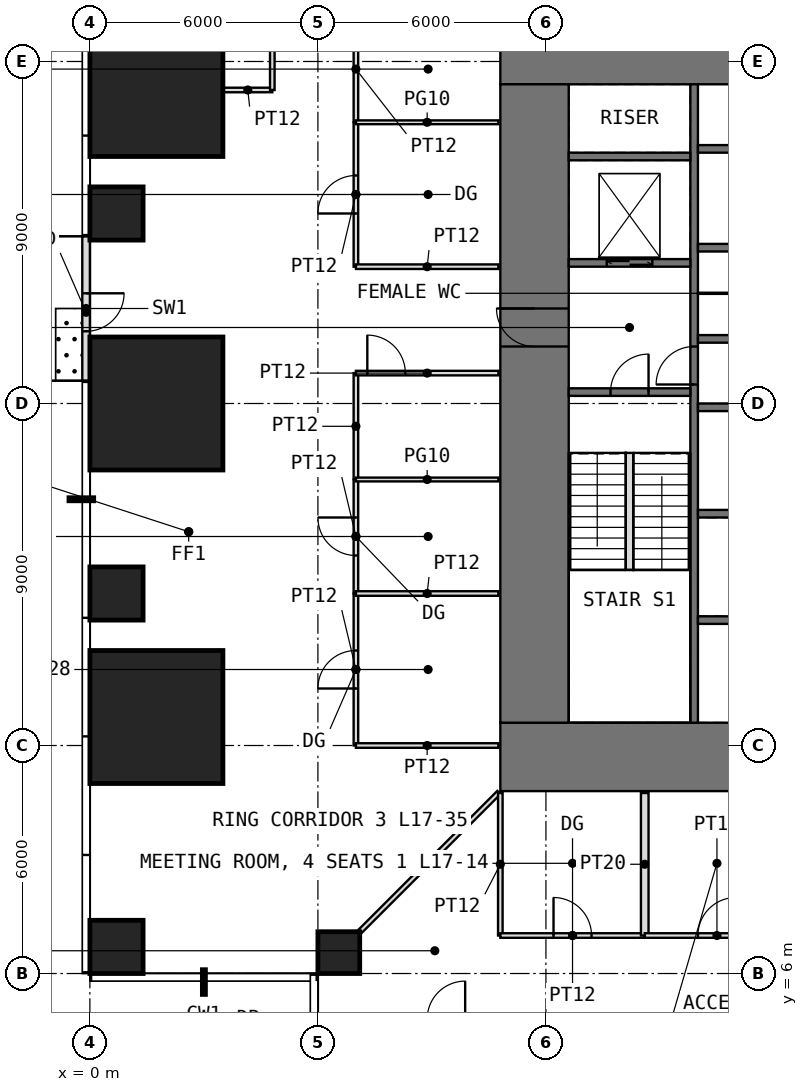
"""IFC4 building model, lengths in metres.
Left out: names, types, materials, properties, quantities, classifications, styles, units other than length and angle.
Written with IfcOpenShell. Run it as: python <this file> out.ifc"""

import sys

from ifc_helpers import new_model, si_unit, direction, frame, frame_2d, origin, origin_2d, place, context, subcontext, project, spatial, rectangle, extrude, element, fill, save


model = new_model("IFC4")
c1 = context("Model", 3, precision=1e-05, world=origin(), true_north=direction((0.0, 1.0)))
c2 = subcontext(c1, "Body", "Model", "MODEL_VIEW")
j1 = project(units=[si_unit("LENGTHUNIT", "METRE"), si_unit("PLANEANGLEUNIT", "RADIAN")], contexts=[c1])
p1 = place(None, origin())
s1 = spatial("IfcSite", under=j1, at=p1, CompositionType="ELEMENT")
p2 = place(p1, origin())
s2 = spatial("IfcBuilding", under=s1, at=p2, CompositionType="ELEMENT")
p3 = place(p2, frame((0.0, 0.0, 74.5)))
s3 = spatial("IfcBuildingStorey", under=s2, at=p3, CompositionType="ELEMENT", Elevation=74.5)
p4 = place(p3, frame((0.7, 6.7, 0.0), z_axis=(0.0, 0.0, 1.0), x_axis=(1.0, 0.0, 0.0)))
e1 = element("IfcColumn", 1, at=p4, inside=s3, PredefinedType="COLUMN", context=c2, shape_type="SweptSolid", body=[
    extrude(rectangle(XDim=1.4, YDim=1.4, at=origin_2d()), origin(), (0.0, 0.0, 1.0), 4.0),
])
p5 = place(p3, frame((6.55, 6.55, 0.0), z_axis=(0.0, 0.0, 1.0), x_axis=(1.0, 0.0, 0.0)))
e2 = element("IfcColumn", 2, at=p5, inside=s3, PredefinedType="COLUMN", context=c2, shape_type="SweptSolid", body=[
    extrude(rectangle(XDim=1.1, YDim=1.1, at=origin_2d()), origin(), (0.0, 0.0, 1.0), 4.0),
])
p6 = place(p3, frame((1.75, 12.75, 0.0), z_axis=(0.0, 0.0, 1.0), x_axis=(1.0, 0.0, 0.0)))
e3 = element("IfcColumn", 3, at=p6, inside=s3, PredefinedType="COLUMN", context=c2, shape_type="SweptSolid", body=[
    extrude(rectangle(XDim=3.5, YDim=3.5, at=origin_2d()), origin(), (0.0, 0.0, 1.0), 4.0),
])
p7 = place(p3, frame((0.7, 16.0, 0.0), z_axis=(0.0, 0.0, 1.0), x_axis=(1.0, 0.0, 0.0)))
e4 = element("IfcColumn", 4, at=p7, inside=s3, PredefinedType="COLUMN", context=c2, shape_type="SweptSolid", body=[
    extrude(rectangle(XDim=1.4, YDim=1.4, at=origin_2d()), origin(), (0.0, 0.0, 1.0), 4.0),
])
p8 = place(p3, frame((1.75, 21.0, 0.0), z_axis=(0.0, 0.0, 1.0), x_axis=(1.0, 0.0, 0.0)))
e5 = element("IfcColumn", 5, at=p8, inside=s3, PredefinedType="COLUMN", context=c2, shape_type="SweptSolid", body=[
    extrude(rectangle(XDim=3.5, YDim=3.5, at=origin_2d()), origin(), (0.0, 0.0, 1.0), 4.0),
])
p9 = place(p3, frame((0.7, 26.0, 0.0), z_axis=(0.0, 0.0, 1.0), x_axis=(1.0, 0.0, 0.0)))
e6 = element("IfcColumn", 6, at=p9, inside=s3, PredefinedType="COLUMN", context=c2, shape_type="SweptSolid", body=[
    extrude(rectangle(XDim=1.4, YDim=1.4, at=origin_2d()), origin(), (0.0, 0.0, 1.0), 4.0),
])
p10 = place(p3, frame((1.75, 29.25, 0.0), z_axis=(0.0, 0.0, 1.0), x_axis=(1.0, 0.0, 0.0)))
e7 = element("IfcColumn", 7, at=p10, inside=s3, PredefinedType="COLUMN", context=c2, shape_type="SweptSolid", body=[
    extrude(rectangle(XDim=3.5, YDim=3.5, at=origin_2d()), origin(), (0.0, 0.0, 1.0), 4.0),
])
p11 = place(p3, frame((-0.1, 25.4, 0.0), z_axis=(0.0, 0.0, 1.0), x_axis=(0.0, -1.0, 0.0)))
e8 = element("IfcWall", 8, at=p11, inside=s3, PredefinedType="USERDEFINED", context=c2, shape_type="SweptSolid", body=[
    extrude(rectangle(XDim=3.8, YDim=0.2, at=frame_2d((1.9, 0.0))), origin(), (0.0, 0.0, 1.0), 3.75),
])
p12 = place(p11, frame((1.5, 0.0, 0.0)))
e9 = element("IfcOpeningElement", 9, at=p12, cuts=e8, PredefinedType="OPENING", context=c2, shape_type="SweptSolid", body=[
    extrude(rectangle(XDim=1.0, YDim=2.4, at=frame_2d((0.5, 1.2))), frame((0.0, 0.11, 0.0), z_axis=(0.0, -1.0, 0.0), x_axis=(1.0, 0.0, 0.0)), (0.0, 0.0, 1.0), 0.22),
])
p13 = place(p3, frame((10.8, 11.7, -0.05), z_axis=(0.0, 0.0, 1.0), x_axis=(1.0, 0.0, 0.0)))
e10 = element("IfcWall", 10, at=p13, inside=s3, PredefinedType="SHEAR", context=c2, shape_type="SweptSolid", body=[
    extrude(rectangle(XDim=20.4, YDim=1.8, at=frame_2d((10.2, 0.0))), origin(), (0.0, 0.0, 1.0), 4.0),
])
p14 = place(p13, frame((9.2, 0.0, 0.05)))
e11 = element("IfcOpeningElement", 11, at=p14, cuts=e10, PredefinedType="OPENING", context=c2, shape_type="SweptSolid", body=[
    extrude(rectangle(XDim=2.0, YDim=2.2, at=frame_2d((1.0, 1.1))), frame((0.0, 0.91, 0.0), z_axis=(0.0, -1.0, 0.0), x_axis=(1.0, 0.0, 0.0)), (0.0, 0.0, 1.0), 1.82),
])
p15 = place(p3, frame((10.8, 30.3, -0.05), z_axis=(0.0, 0.0, 1.0), x_axis=(1.0, 0.0, 0.0)))
e12 = element("IfcWall", 12, at=p15, inside=s3, PredefinedType="SHEAR", context=c2, shape_type="SweptSolid", body=[
    extrude(rectangle(XDim=20.4, YDim=1.8, at=frame_2d((10.2, 0.0))), origin(), (0.0, 0.0, 1.0), 4.0),
])
p16 = place(p15, frame((9.2, 0.0, 0.05)))
e13 = element("IfcOpeningElement", 13, at=p16, cuts=e12, PredefinedType="OPENING", context=c2, shape_type="SweptSolid", body=[
    extrude(rectangle(XDim=2.0, YDim=2.2, at=frame_2d((1.0, 1.1))), frame((0.0, 0.91, 0.0), z_axis=(0.0, -1.0, 0.0), x_axis=(1.0, 0.0, 0.0)), (0.0, 0.0, 1.0), 1.82),
])
p17 = place(p3, frame((11.7, 12.6, -0.05), z_axis=(0.0, 0.0, 1.0), x_axis=(0.0, 1.0, 0.0)))
e14 = element("IfcWall", 14, at=p17, inside=s3, PredefinedType="SHEAR", context=c2, shape_type="SweptSolid", body=[
    extrude(rectangle(XDim=16.8, YDim=1.8, at=frame_2d((8.4, 0.0))), origin(), (0.0, 0.0, 1.0), 4.0),
])
p18 = place(p17, frame((9.9, 0.0, 0.05)))
e15 = element("IfcOpeningElement", 15, at=p18, cuts=e14, PredefinedType="OPENING", context=c2, shape_type="SweptSolid", body=[
    extrude(rectangle(XDim=1.0, YDim=2.2, at=frame_2d((0.5, 1.1))), frame((0.0, 0.91, 0.0), z_axis=(0.0, -1.0, 0.0), x_axis=(1.0, 0.0, 0.0)), (0.0, 0.0, 1.0), 1.82),
])
p19 = place(p3, frame((15.9, 12.6, -0.05), z_axis=(0.0, 0.0, 1.0), x_axis=(0.0, 1.0, 0.0)))
e16 = element("IfcWall", 16, at=p19, inside=s3, PredefinedType="SHEAR", context=c2, shape_type="SweptSolid", body=[
    extrude(rectangle(XDim=16.8, YDim=0.2, at=frame_2d((8.4, 0.0))), origin(), (0.0, 0.0, 1.0), 4.0),
])
p20 = place(p19, frame((8.9, 0.0, 0.05)))
e17 = element("IfcOpeningElement", 17, at=p20, cuts=e16, PredefinedType="OPENING", context=c2, shape_type="SweptSolid", body=[
    extrude(rectangle(XDim=1.0, YDim=2.2, at=frame_2d((0.5, 1.1))), frame((0.0, 0.11, 0.0), z_axis=(0.0, -1.0, 0.0), x_axis=(1.0, 0.0, 0.0)), (0.0, 0.0, 1.0), 0.22),
])
p21 = place(p3, frame((12.6, 21.3, -0.05), z_axis=(0.0, 0.0, 1.0), x_axis=(1.0, 0.0, 0.0)))
e18 = element("IfcWall", 18, at=p21, inside=s3, PredefinedType="SHEAR", context=c2, shape_type="SweptSolid", body=[
    extrude(rectangle(XDim=3.2, YDim=0.2, at=frame_2d((1.6, 0.0))), origin(), (0.0, 0.0, 1.0), 4.0),
])
p22 = place(p21, frame((1.1, 0.0, 0.05)))
e19 = element("IfcOpeningElement", 19, at=p22, cuts=e18, PredefinedType="OPENING", context=c2, shape_type="SweptSolid", body=[
    extrude(rectangle(XDim=1.0, YDim=2.2, at=frame_2d((0.5, 1.1))), frame((0.0, 0.11, 0.0), z_axis=(0.0, -1.0, 0.0), x_axis=(1.0, 0.0, 0.0)), (0.0, 0.0, 1.0), 0.22),
])
p23 = place(p3, frame((12.6, 24.7, -0.05), z_axis=(0.0, 0.0, 1.0), x_axis=(1.0, 0.0, 0.0)))
e20 = element("IfcWall", 20, at=p23, inside=s3, PredefinedType="SHEAR", context=c2, shape_type="SweptSolid", body=[
    extrude(rectangle(XDim=3.2, YDim=0.2, at=frame_2d((1.6, 0.0))), origin(), (0.0, 0.0, 1.0), 4.0),
])
p24 = place(p23, frame((1.0, 0.0, 0.05)))
e21 = element("IfcOpeningElement", 21, at=p24, cuts=e20, PredefinedType="OPENING", context=c2, shape_type="SweptSolid", body=[
    extrude(rectangle(XDim=1.2, YDim=2.2, at=frame_2d((0.6, 1.1))), frame((0.0, 0.11, 0.0), z_axis=(0.0, -1.0, 0.0), x_axis=(1.0, 0.0, 0.0)), (0.0, 0.0, 1.0), 0.22),
])
for number, where, z_axis, x_axis in (
    (22, (12.6, 27.5, -0.05), (0.0, 0.0, 1.0), (1.0, 0.0, 0.0)),
    (23, (16.0, 15.3, -0.05), (0.0, 0.0, 1.0), (1.0, 0.0, 0.0)),
    (24, (16.0, 18.1, -0.05), (0.0, 0.0, 1.0), (1.0, 0.0, 0.0)),
    (25, (16.0, 20.9, -0.05), (0.0, 0.0, 1.0), (1.0, 0.0, 0.0)),
    (26, (16.0, 22.7, -0.05), (0.0, 0.0, 1.0), (1.0, 0.0, 0.0)),
    (27, (16.0, 25.1, -0.05), (0.0, 0.0, 1.0), (1.0, 0.0, 0.0)),
    (28, (16.0, 27.7, -0.05), (0.0, 0.0, 1.0), (1.0, 0.0, 0.0)),
):
    element("IfcWall", number, at=place(p3, frame(where, z_axis=z_axis, x_axis=x_axis)), inside=s3, PredefinedType="SHEAR", context=c2, shape_type="SweptSolid", body=[
        extrude(rectangle(XDim=3.2, YDim=0.2, at=frame_2d((1.6, 0.0))), origin(), (0.0, 0.0, 1.0), 4.0),
    ])
p25 = place(p3, frame((16.0, 23.9, 0.0), z_axis=(0.0, 0.0, 1.0), x_axis=(1.0, 0.0, 0.0)))
e29 = element("IfcWall", 29, at=p25, inside=s3, PredefinedType="PARTITIONING", context=c2, shape_type="SweptSolid", body=[
    extrude(rectangle(XDim=1.4, YDim=0.03, at=frame_2d((0.7, 0.0))), origin(), (0.0, 0.0, 1.0), 3.75),
])
p26 = place(p3, frame((3.51, 29.25, 0.0), z_axis=(0.0, 0.0, 1.0), x_axis=(1.0, 0.0, 0.0)))
e30 = element("IfcWall", 30, at=p26, inside=s3, PredefinedType="PARTITIONING", context=c2, shape_type="SweptSolid", body=[
    extrude(rectangle(XDim=1.29, YDim=0.12, at=frame_2d((0.645, 0.0))), origin(), (0.0, 0.0, 1.0), 3.75),
])
p27 = place(p3, frame((4.8, 29.25, 0.0), z_axis=(0.0, 0.0, 1.0), x_axis=(0.0, 1.0, 0.0)))
e31 = element("IfcWall", 31, at=p27, inside=s3, PredefinedType="PARTITIONING", context=c2, shape_type="SweptSolid", body=[
    extrude(rectangle(XDim=6.75, YDim=0.12, at=frame_2d((3.375, 0.0))), origin(), (0.0, 0.0, 1.0), 3.75),
])
p28 = place(p27, frame((2.875, 0.0, 0.0)))
e32 = element("IfcOpeningElement", 32, at=p28, cuts=e31, PredefinedType="OPENING", context=c2, shape_type="SweptSolid", body=[
    extrude(rectangle(XDim=1.0, YDim=2.2, at=frame_2d((0.5, 1.1))), frame((0.0, 0.07, 0.0), z_axis=(0.0, -1.0, 0.0), x_axis=(1.0, 0.0, 0.0)), (0.0, 0.0, 1.0), 0.14),
])
p29 = place(p3, frame((7.0, 12.0, 0.0), z_axis=(0.0, 0.0, 1.0), x_axis=(0.0, 1.0, 0.0)))
e33 = element("IfcWall", 33, at=p29, inside=s3, PredefinedType="PARTITIONING", context=c2, shape_type="SweptSolid", body=[
    extrude(rectangle(XDim=4.0, YDim=0.12, at=frame_2d((2.0, 0.0))), origin(), (0.0, 0.0, 1.0), 3.75),
])
p30 = place(p29, frame((1.5, 0.0, 0.0)))
e34 = element("IfcOpeningElement", 34, at=p30, cuts=e33, PredefinedType="OPENING", context=c2, shape_type="SweptSolid", body=[
    extrude(rectangle(XDim=1.0, YDim=2.4, at=frame_2d((0.5, 1.2))), frame((0.0, 0.07, 0.0), z_axis=(0.0, -1.0, 0.0), x_axis=(1.0, 0.0, 0.0)), (0.0, 0.0, 1.0), 0.14),
])
p31 = place(p3, frame((7.0, 12.0, 0.0), z_axis=(0.0, 0.0, 1.0), x_axis=(1.0, 0.0, 0.0)))
e35 = element("IfcWall", 35, at=p31, inside=s3, PredefinedType="PARTITIONING", context=c2, shape_type="SweptSolid", body=[
    extrude(rectangle(XDim=3.75, YDim=0.12, at=frame_2d((1.875, 0.0))), origin(), (0.0, 0.0, 1.0), 3.75),
])
p32 = place(p3, frame((7.0, 16.0, 0.0), z_axis=(0.0, 0.0, 1.0), x_axis=(0.0, 1.0, 0.0)))
e36 = element("IfcWall", 36, at=p32, inside=s3, PredefinedType="PARTITIONING", context=c2, shape_type="SweptSolid", body=[
    extrude(rectangle(XDim=3.0, YDim=0.12, at=frame_2d((1.5, 0.0))), origin(), (0.0, 0.0, 1.0), 3.75),
])
p33 = place(p32, frame((1.0, 0.0, 0.0)))
e37 = element("IfcOpeningElement", 37, at=p33, cuts=e36, PredefinedType="OPENING", context=c2, shape_type="SweptSolid", body=[
    extrude(rectangle(XDim=1.0, YDim=2.4, at=frame_2d((0.5, 1.2))), frame((0.0, 0.07, 0.0), z_axis=(0.0, -1.0, 0.0), x_axis=(1.0, 0.0, 0.0)), (0.0, 0.0, 1.0), 0.14),
])
p34 = place(p3, frame((7.0, 16.0, 0.0), z_axis=(0.0, 0.0, 1.0), x_axis=(1.0, 0.0, 0.0)))
e38 = element("IfcWall", 38, at=p34, inside=s3, PredefinedType="PARTITIONING", context=c2, shape_type="SweptSolid", body=[
    extrude(rectangle(XDim=3.75, YDim=0.12, at=frame_2d((1.875, 0.0))), origin(), (0.0, 0.0, 1.0), 3.75),
])
p35 = place(p3, frame((7.0, 19.0, 0.0), z_axis=(0.0, 0.0, 1.0), x_axis=(0.0, 1.0, 0.0)))
e39 = element("IfcWall", 39, at=p35, inside=s3, PredefinedType="PARTITIONING", context=c2, shape_type="SweptSolid", body=[
    extrude(rectangle(XDim=2.8, YDim=0.12, at=frame_2d((1.4, 0.0))), origin(), (0.0, 0.0, 1.0), 3.75),
])
p36 = place(p3, frame((7.0, 19.0, 0.0), z_axis=(0.0, 0.0, 1.0), x_axis=(1.0, 0.0, 0.0)))
e40 = element("IfcWall", 40, at=p36, inside=s3, PredefinedType="PARTITIONING", context=c2, shape_type="SweptSolid", body=[
    extrude(rectangle(XDim=3.75, YDim=0.1, at=frame_2d((1.875, 0.0))), origin(), (0.0, 0.0, 1.0), 3.75),
])
p37 = place(p3, frame((7.0, 21.8, 0.0), z_axis=(0.0, 0.0, 1.0), x_axis=(1.0, 0.0, 0.0)))
e41 = element("IfcWall", 41, at=p37, inside=s3, PredefinedType="PARTITIONING", context=c2, shape_type="SweptSolid", body=[
    extrude(rectangle(XDim=3.75, YDim=0.12, at=frame_2d((1.875, 0.0))), origin(), (0.0, 0.0, 1.0), 3.75),
])
p38 = place(p37, frame((0.3, 0.0, 0.0)))
e42 = element("IfcOpeningElement", 42, at=p38, cuts=e41, PredefinedType="OPENING", context=c2, shape_type="SweptSolid", body=[
    extrude(rectangle(XDim=1.0, YDim=2.4, at=frame_2d((0.5, 1.2))), frame((0.0, 0.07, 0.0), z_axis=(0.0, -1.0, 0.0), x_axis=(1.0, 0.0, 0.0)), (0.0, 0.0, 1.0), 0.14),
])
p39 = place(p3, frame((7.0, 24.6, 0.0), z_axis=(0.0, 0.0, 1.0), x_axis=(0.0, 1.0, 0.0)))
e43 = element("IfcWall", 43, at=p39, inside=s3, PredefinedType="PARTITIONING", context=c2, shape_type="SweptSolid", body=[
    extrude(rectangle(XDim=3.8, YDim=0.12, at=frame_2d((1.9, 0.0))), origin(), (0.0, 0.0, 1.0), 3.75),
])
p40 = place(p39, frame((1.4, 0.0, 0.0)))
e44 = element("IfcOpeningElement", 44, at=p40, cuts=e43, PredefinedType="OPENING", context=c2, shape_type="SweptSolid", body=[
    extrude(rectangle(XDim=1.0, YDim=2.4, at=frame_2d((0.5, 1.2))), frame((0.0, 0.07, 0.0), z_axis=(0.0, -1.0, 0.0), x_axis=(1.0, 0.0, 0.0)), (0.0, 0.0, 1.0), 0.14),
])
p41 = place(p3, frame((7.0, 24.6, 0.0), z_axis=(0.0, 0.0, 1.0), x_axis=(1.0, 0.0, 0.0)))
e45 = element("IfcWall", 45, at=p41, inside=s3, PredefinedType="PARTITIONING", context=c2, shape_type="SweptSolid", body=[
    extrude(rectangle(XDim=3.75, YDim=0.12, at=frame_2d((1.875, 0.0))), origin(), (0.0, 0.0, 1.0), 3.75),
])
p42 = place(p3, frame((7.0, 28.4, 0.0), z_axis=(0.0, 0.0, 1.0), x_axis=(0.0, 1.0, 0.0)))
e46 = element("IfcWall", 46, at=p42, inside=s3, PredefinedType="PARTITIONING", context=c2, shape_type="SweptSolid", body=[
    extrude(rectangle(XDim=2.8, YDim=0.12, at=frame_2d((1.4, 0.0))), origin(), (0.0, 0.0, 1.0), 3.75),
])
p43 = place(p3, frame((7.0, 28.4, 0.0), z_axis=(0.0, 0.0, 1.0), x_axis=(1.0, 0.0, 0.0)))
e47 = element("IfcWall", 47, at=p43, inside=s3, PredefinedType="PARTITIONING", context=c2, shape_type="SweptSolid", body=[
    extrude(rectangle(XDim=3.75, YDim=0.1, at=frame_2d((1.875, 0.0))), origin(), (0.0, 0.0, 1.0), 3.75),
])
p44 = place(p3, frame((7.11, 7.11, 0.0), z_axis=(0.0, 0.0, 1.0), x_axis=(0.707106781187, 0.707106781187, 0.0)))
e48 = element("IfcWall", 48, at=p44, inside=s3, PredefinedType="PARTITIONING", context=c2, shape_type="SweptSolid", body=[
    extrude(rectangle(XDim=5.168, YDim=0.12, at=frame_2d((2.584, 0.0))), origin(), (0.0, 0.0, 1.0), 3.75),
])
p45 = place(p3, frame((10.8, 7.0, 0.0), z_axis=(0.0, 0.0, 1.0), x_axis=(0.0, 1.0, 0.0)))
e49 = element("IfcWall", 49, at=p45, inside=s3, PredefinedType="PARTITIONING", context=c2, shape_type="SweptSolid", body=[
    extrude(rectangle(XDim=3.75, YDim=0.12, at=frame_2d((1.875, 0.0))), origin(), (0.0, 0.0, 1.0), 3.75),
])
p46 = place(p3, frame((10.8, 7.0, 0.0), z_axis=(0.0, 0.0, 1.0), x_axis=(1.0, 0.0, 0.0)))
e50 = element("IfcWall", 50, at=p46, inside=s3, PredefinedType="PARTITIONING", context=c2, shape_type="SweptSolid", body=[
    extrude(rectangle(XDim=3.8, YDim=0.12, at=frame_2d((1.9, 0.0))), origin(), (0.0, 0.0, 1.0), 3.75),
])
p47 = place(p46, frame((1.4, 0.0, 0.0)))
e51 = element("IfcOpeningElement", 51, at=p47, cuts=e50, PredefinedType="OPENING", context=c2, shape_type="SweptSolid", body=[
    extrude(rectangle(XDim=1.0, YDim=2.4, at=frame_2d((0.5, 1.2))), frame((0.0, 0.07, 0.0), z_axis=(0.0, -1.0, 0.0), x_axis=(1.0, 0.0, 0.0)), (0.0, 0.0, 1.0), 0.14),
])
p48 = place(p3, frame((14.6, 7.0, 0.0), z_axis=(0.0, 0.0, 1.0), x_axis=(0.0, 1.0, 0.0)))
e52 = element("IfcWall", 52, at=p48, inside=s3, PredefinedType="PARTITIONING", context=c2, shape_type="SweptSolid", body=[
    extrude(rectangle(XDim=3.75, YDim=0.2, at=frame_2d((1.875, 0.0))), origin(), (0.0, 0.0, 1.0), 3.75),
])
p49 = place(p3, frame((14.6, 7.0, 0.0), z_axis=(0.0, 0.0, 1.0), x_axis=(1.0, 0.0, 0.0)))
e53 = element("IfcWall", 53, at=p49, inside=s3, PredefinedType="PARTITIONING", context=c2, shape_type="SweptSolid", body=[
    extrude(rectangle(XDim=3.8, YDim=0.12, at=frame_2d((1.9, 0.0))), origin(), (0.0, 0.0, 1.0), 3.75),
])
p50 = place(p49, frame((1.4, 0.0, 0.0)))
e54 = element("IfcOpeningElement", 54, at=p50, cuts=e53, PredefinedType="OPENING", context=c2, shape_type="SweptSolid", body=[
    extrude(rectangle(XDim=1.0, YDim=2.4, at=frame_2d((0.5, 1.2))), frame((0.0, 0.07, 0.0), z_axis=(0.0, -1.0, 0.0), x_axis=(1.0, 0.0, 0.0)), (0.0, 0.0, 1.0), 0.14),
])
p51 = place(p3, frame((14.2, 16.62, 0.0), z_axis=(0.0, 0.0, 1.0), x_axis=(0.0, 1.0, 0.0)))
e55 = element("IfcWall", 55, at=p51, inside=s3, PredefinedType="PARTITIONING", context=c2, shape_type="SweptSolid", body=[
    extrude(rectangle(XDim=3.08, YDim=0.2, at=frame_2d((1.54, 0.0))), origin(), (0.0, 0.0, 1.0), 4.0),
])
p52 = place(p12, origin())
e56 = element("IfcDoor", 56, at=p52, inside=s3, OperationType="SINGLE_SWING_LEFT", PredefinedType="DOOR", context=c2, shape_type="SweptSolid", body=[
    extrude(rectangle(XDim=1.0, YDim=2.4, at=frame_2d((0.5, 1.2))), frame((0.0, 0.025, 0.0), z_axis=(0.0, -1.0, 0.0), x_axis=(1.0, 0.0, 0.0)), (0.0, 0.0, 1.0), 0.05),
])
fill(e9, e56)
p53 = place(p18, origin())
e57 = element("IfcDoor", 57, at=p53, inside=s3, OperationType="SINGLE_SWING_RIGHT", PredefinedType="DOOR", context=c2, shape_type="SweptSolid", body=[
    extrude(rectangle(XDim=1.0, YDim=2.2, at=frame_2d((0.5, 1.1))), frame((0.0, 0.025, 0.0), z_axis=(0.0, -1.0, 0.0), x_axis=(1.0, 0.0, 0.0)), (0.0, 0.0, 1.0), 0.05),
])
fill(e15, e57)
p54 = place(p22, origin())
e58 = element("IfcDoor", 58, at=p54, inside=s3, OperationType="SINGLE_SWING_RIGHT", PredefinedType="DOOR", context=c2, shape_type="SweptSolid", body=[
    extrude(rectangle(XDim=1.0, YDim=2.2, at=frame_2d((0.5, 1.1))), frame((0.0, 0.025, 0.0), z_axis=(0.0, -1.0, 0.0), x_axis=(1.0, 0.0, 0.0)), (0.0, 0.0, 1.0), 0.05),
])
fill(e19, e58)
p55 = place(p20, origin())
e59 = element("IfcDoor", 59, at=p55, inside=s3, OperationType="SINGLE_SWING_LEFT", PredefinedType="DOOR", context=c2, shape_type="SweptSolid", body=[
    extrude(rectangle(XDim=1.0, YDim=2.2, at=frame_2d((0.5, 1.1))), frame((0.0, 0.025, 0.0), z_axis=(0.0, -1.0, 0.0), x_axis=(1.0, 0.0, 0.0)), (0.0, 0.0, 1.0), 0.05),
])
fill(e17, e59)
p56 = place(p47, origin())
e60 = element("IfcDoor", 60, at=p56, inside=s3, OperationType="SINGLE_SWING_LEFT", PredefinedType="DOOR", context=c2, shape_type="SweptSolid", body=[
    extrude(rectangle(XDim=1.0, YDim=2.4, at=frame_2d((0.5, 1.2))), frame((0.0, 0.025, 0.0), z_axis=(0.0, -1.0, 0.0), x_axis=(1.0, 0.0, 0.0)), (0.0, 0.0, 1.0), 0.05),
])
fill(e51, e60)
p57 = place(p50, origin())
e61 = element("IfcDoor", 61, at=p57, inside=s3, OperationType="SINGLE_SWING_RIGHT", PredefinedType="DOOR", context=c2, shape_type="SweptSolid", body=[
    extrude(rectangle(XDim=1.0, YDim=2.4, at=frame_2d((0.5, 1.2))), frame((0.0, 0.025, 0.0), z_axis=(0.0, -1.0, 0.0), x_axis=(1.0, 0.0, 0.0)), (0.0, 0.0, 1.0), 0.05),
])
fill(e54, e61)
p58 = place(p30, origin())
e62 = element("IfcDoor", 62, at=p58, inside=s3, OperationType="SINGLE_SWING_LEFT", PredefinedType="DOOR", context=c2, shape_type="SweptSolid", body=[
    extrude(rectangle(XDim=1.0, YDim=2.4, at=frame_2d((0.5, 1.2))), frame((0.0, 0.025, 0.0), z_axis=(0.0, -1.0, 0.0), x_axis=(1.0, 0.0, 0.0)), (0.0, 0.0, 1.0), 0.05),
])
fill(e34, e62)
p59 = place(p33, origin())
e63 = element("IfcDoor", 63, at=p59, inside=s3, OperationType="SINGLE_SWING_RIGHT", PredefinedType="DOOR", context=c2, shape_type="SweptSolid", body=[
    extrude(rectangle(XDim=1.0, YDim=2.4, at=frame_2d((0.5, 1.2))), frame((0.0, 0.025, 0.0), z_axis=(0.0, -1.0, 0.0), x_axis=(1.0, 0.0, 0.0)), (0.0, 0.0, 1.0), 0.05),
])
fill(e37, e63)
p60 = place(p40, origin())
e64 = element("IfcDoor", 64, at=p60, inside=s3, OperationType="SINGLE_SWING_LEFT", PredefinedType="DOOR", context=c2, shape_type="SweptSolid", body=[
    extrude(rectangle(XDim=1.0, YDim=2.4, at=frame_2d((0.5, 1.2))), frame((0.0, 0.025, 0.0), z_axis=(0.0, -1.0, 0.0), x_axis=(1.0, 0.0, 0.0)), (0.0, 0.0, 1.0), 0.05),
])
fill(e44, e64)
p61 = place(p38, origin())
e65 = element("IfcDoor", 65, at=p61, inside=s3, OperationType="SINGLE_SWING_LEFT", PredefinedType="DOOR", context=c2, shape_type="SweptSolid", body=[
    extrude(rectangle(XDim=1.0, YDim=2.4, at=frame_2d((0.5, 1.2))), frame((0.0, 0.025, 0.0), z_axis=(0.0, -1.0, 0.0), x_axis=(1.0, 0.0, 0.0)), (0.0, 0.0, 1.0), 0.05),
])
fill(e42, e65)
p62 = place(p24, origin())
e66 = element("IfcDoor", 66, at=p62, inside=s3, OperationType="DOUBLE_DOOR_SLIDING", PredefinedType="DOOR", context=c2, shape_type="SweptSolid", body=[
    extrude(rectangle(XDim=1.2, YDim=2.2, at=frame_2d((0.6, 1.1))), frame((0.0, 0.025, 0.0), z_axis=(0.0, -1.0, 0.0), x_axis=(1.0, 0.0, 0.0)), (0.0, 0.0, 1.0), 0.05),
])
fill(e21, e66)
save(model, sys.argv[1])
